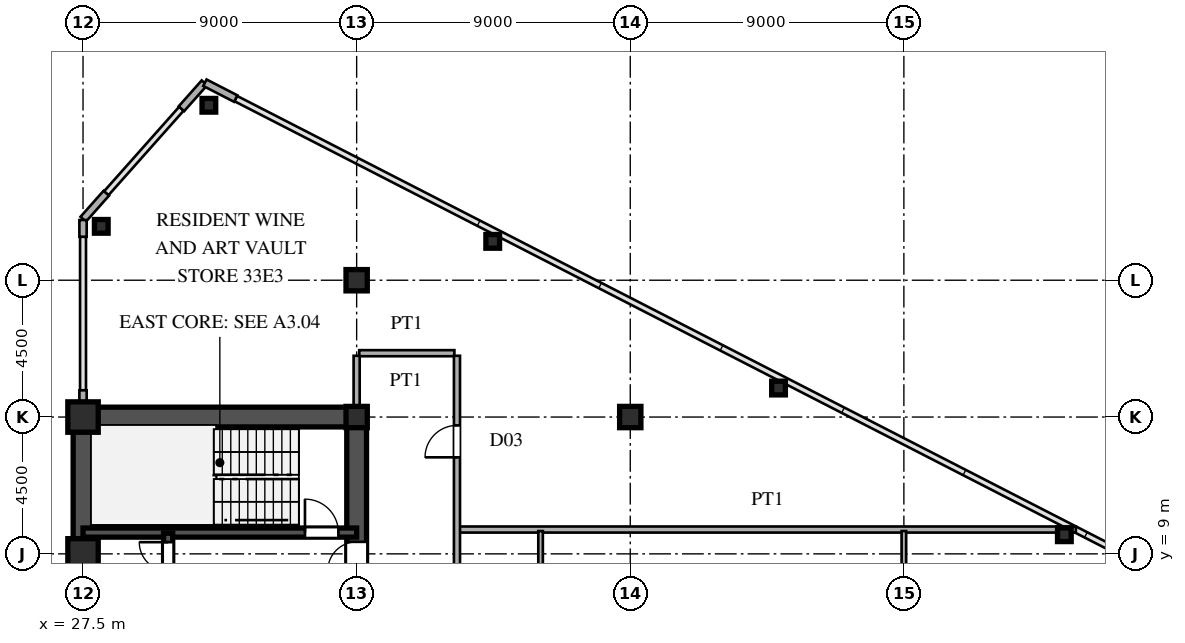
"""IFC4 building model, lengths in metres.
Left out: names, types, materials, properties, quantities, classifications, styles, units other than length and angle.
Written with IfcOpenShell. Run it as: python <this file> out.ifc"""

import sys

from ifc_helpers import new_model, si_unit, direction, frame, frame_2d, origin, origin_2d, place, context, subcontext, project, spatial, rectangle, hollow_rectangle, i_section, extrude, source, transform, mapped, element, fill, save


model = new_model("IFC4")
c1 = context("Model", 3, precision=1e-05, world=origin(), true_north=direction((0.0, 1.0)))
c2 = subcontext(c1, "Body", "Model", "MODEL_VIEW")
j1 = project(units=[si_unit("LENGTHUNIT", "METRE"), si_unit("PLANEANGLEUNIT", "RADIAN")], contexts=[c1])
p1 = place(None, origin())
s1 = spatial("IfcSite", under=j1, at=p1, CompositionType="ELEMENT")
p2 = place(p1, origin())
s2 = spatial("IfcBuilding", under=s1, at=p2, CompositionType="ELEMENT")
p3 = place(p2, frame((0.0, 0.0, 124.8)))
s3 = spatial("IfcBuildingStorey", under=s2, at=p3, CompositionType="ELEMENT", Elevation=124.8)
m1 = source(origin(), c2, "Body", "SweptSolid", [
    extrude(hollow_rectangle(XDim=1.0, YDim=1.0, WallThickness=0.042, at=origin_2d()), origin(), (0.0, 0.0, 1.0), 3.6),
])
for number, where, z_axis, x_axis in (
    (1, (27.5, 9.0, 0.0), (0.0, 0.0, 1.0), (1.0, 0.0, 0.0)),
    (2, (27.5, 13.5, 0.0), (0.0, 0.0, 1.0), (1.0, 0.0, 0.0)),
):
    element("IfcColumn", number, at=place(p3, frame(where, z_axis=z_axis, x_axis=x_axis)), inside=s3, PredefinedType="COLUMN", context=c2, shape_type="MappedRepresentation", body=[
        mapped(m1, transform((0.0, 0.0, 0.0), scale=1.0)),
    ])
m2 = source(origin(), c2, "Body", "SweptSolid", [
    extrude(i_section(OverallWidth=0.7, OverallDepth=0.7, WebThickness=0.028, FlangeThickness=0.045, at=origin_2d()), origin(), (0.0, 0.0, 1.0), 3.6),
])
for number, where, z_axis, x_axis in (
    (3, (36.5, 13.5, 0.0), (0.0, 0.0, 1.0), (1.0, 0.0, 0.0)),
    (4, (36.5, 18.0, 0.0), (0.0, 0.0, 1.0), (1.0, 0.0, 0.0)),
    (5, (45.5, 13.5, 0.0), (0.0, 0.0, 1.0), (1.0, 0.0, 0.0)),
):
    element("IfcColumn", number, at=place(p3, frame(where, z_axis=z_axis, x_axis=x_axis)), inside=s3, PredefinedType="COLUMN", context=c2, shape_type="MappedRepresentation", body=[
        mapped(m2, transform((0.0, 0.0, 0.0), scale=1.0)),
    ])
m3 = source(origin(), c2, "Body", "SweptSolid", [
    extrude(hollow_rectangle(XDim=0.45, YDim=0.45, WallThickness=0.018, at=origin_2d()), origin(), (0.0, 0.0, 1.0), 3.6),
])
for number, where, z_axis, x_axis in (
    (6, (31.64, 23.754, 0.0), (0.0, 0.0, 1.0), (1.0, 0.0, 0.0)),
    (7, (28.1, 19.772, 0.0), (0.0, 0.0, 1.0), (1.0, 0.0, 0.0)),
    (8, (40.976, 19.278, 0.0), (0.0, 0.0, 1.0), (1.0, 0.0, 0.0)),
    (9, (50.377, 14.453, 0.0), (0.0, 0.0, 1.0), (1.0, 0.0, 0.0)),
    (10, (59.779, 9.629, 0.0), (0.0, 0.0, 1.0), (1.0, 0.0, 0.0)),
):
    element("IfcColumn", number, at=place(p3, frame(where, z_axis=z_axis, x_axis=x_axis)), inside=s3, PredefinedType="COLUMN", context=c2, shape_type="MappedRepresentation", body=[
        mapped(m3, transform((0.0, 0.0, 0.0), scale=1.0)),
    ])
p4 = place(p3, frame((32.523, 23.975, 0.0), z_axis=(0.0, 0.0, 1.0), x_axis=(-0.889797395748, 0.456355776255, 0.0)))
e11 = element("IfcWall", 11, at=p4, inside=s3, PredefinedType="SOLIDWALL", context=c2, shape_type="SweptSolid", body=[
    extrude(rectangle(XDim=1.14, YDim=0.24, at=frame_2d((0.57, 0.0))), origin(), (0.0, 0.0, 1.0), 3.38),
])
for number, where, z_axis, x_axis in (
    (12, (31.493, 24.492, 0.0), (0.0, 0.0, 1.0), (-0.664, -0.747, 0.0)),
    (13, (28.264, 20.86, 0.0), (0.0, 0.0, 1.0), (-0.664, -0.747, 0.0)),
):
    element("IfcWall", number, at=place(p3, frame(where, z_axis=z_axis, x_axis=x_axis)), inside=s3, PredefinedType="SOLIDWALL", context=c2, shape_type="SweptSolid", body=[
        extrude(rectangle(XDim=1.14, YDim=0.24, at=frame_2d((0.57, 0.0))), origin(), (0.0, 0.0, 1.0), 3.38),
    ])
p5 = place(p3, frame((27.5, 13.83, 0.0), z_axis=(0.0, 0.0, 1.0), x_axis=(0.0, 1.0, 0.0)))
e14 = element("IfcWall", 14, at=p5, inside=s3, PredefinedType="SOLIDWALL", context=c2, shape_type="SweptSolid", body=[
    extrude(rectangle(XDim=0.55, YDim=0.24, at=frame_2d((0.275, 0.0))), origin(), (0.0, 0.0, 1.0), 2.88),
])
p6 = place(p3, frame((27.5, 19.43, 0.0), z_axis=(0.0, 0.0, 1.0), x_axis=(0.0, 1.0, 0.0)))
e15 = element("IfcWall", 15, at=p6, inside=s3, PredefinedType="SOLIDWALL", context=c2, shape_type="SweptSolid", body=[
    extrude(rectangle(XDim=0.55, YDim=0.24, at=frame_2d((0.275, 0.0))), origin(), (0.0, 0.0, 1.0), 3.38),
])
p7 = place(p3, frame((27.5, 1.3, 0.0), z_axis=(0.0, 0.0, 1.0), x_axis=(0.0, 1.0, 0.0)))
e16 = element("IfcWall", 16, at=p7, inside=s3, PredefinedType="SHEAR", context=c2, shape_type="SweptSolid", body=[
    extrude(rectangle(XDim=12.2, YDim=0.65, at=frame_2d((6.1, 0.0))), origin(), (0.0, 0.0, 1.0), 3.38),
])
p8 = place(p3, frame((27.5, 13.5, 0.0), z_axis=(0.0, 0.0, 1.0), x_axis=(1.0, 0.0, 0.0)))
e17 = element("IfcWall", 17, at=p8, inside=s3, PredefinedType="SHEAR", context=c2, shape_type="SweptSolid", body=[
    extrude(rectangle(XDim=9.0, YDim=0.65, at=frame_2d((4.5, 0.0))), origin(), (0.0, 0.0, 1.0), 3.38),
])
p9 = place(p3, frame((36.5, 8.2, 0.0), z_axis=(0.0, 0.0, 1.0), x_axis=(0.0, 1.0, 0.0)))
e18 = element("IfcWall", 18, at=p9, inside=s3, PredefinedType="SHEAR", context=c2, shape_type="SweptSolid", body=[
    extrude(rectangle(XDim=5.45, YDim=0.65, at=frame_2d((2.725, 0.0))), origin(), (0.0, 0.0, 1.0), 3.38),
])
p10 = place(p9, frame((0.245, 0.0, 0.0)))
e19 = element("IfcOpeningElement", 19, at=p10, cuts=e18, PredefinedType="OPENING", context=c2, shape_type="SweptSolid", body=[
    extrude(rectangle(XDim=0.95, YDim=2.15, at=frame_2d((0.475, 1.075))), frame((0.0, 0.335, 0.0), z_axis=(0.0, -1.0, 0.0), x_axis=(1.0, 0.0, 0.0)), (0.0, 0.0, 1.0), 0.67),
])
p11 = place(p3, frame((27.5, 9.7, 0.0), z_axis=(0.0, 0.0, 1.0), x_axis=(1.0, 0.0, 0.0)))
e20 = element("IfcWall", 20, at=p11, inside=s3, PredefinedType="SHEAR", context=c2, shape_type="SweptSolid", body=[
    extrude(rectangle(XDim=9.0, YDim=0.3, at=frame_2d((4.5, 0.0))), origin(), (0.0, 0.0, 1.0), 3.38),
])
p12 = place(p11, frame((7.3, 0.0, 0.0)))
e21 = element("IfcOpeningElement", 21, at=p12, cuts=e20, PredefinedType="OPENING", context=c2, shape_type="SweptSolid", body=[
    extrude(rectangle(XDim=1.1, YDim=2.2, at=frame_2d((0.55, 1.1))), frame((0.0, 0.16, 0.0), z_axis=(0.0, -1.0, 0.0), x_axis=(1.0, 0.0, 0.0)), (0.0, 0.0, 1.0), 0.32),
])
p13 = place(p3, frame((30.3, 8.15, 0.0), z_axis=(0.0, 0.0, 1.0), x_axis=(0.0, 1.0, 0.0)))
e22 = element("IfcWall", 22, at=p13, inside=s3, PredefinedType="SHEAR", context=c2, shape_type="SweptSolid", body=[
    extrude(rectangle(XDim=1.53, YDim=0.3, at=frame_2d((0.765, 0.0))), origin(), (0.0, 0.0, 1.0), 3.38),
])
p14 = place(p13, frame((0.285, 0.0, 0.0)))
e23 = element("IfcOpeningElement", 23, at=p14, cuts=e22, PredefinedType="OPENING", context=c2, shape_type="SweptSolid", body=[
    extrude(rectangle(XDim=0.95, YDim=2.15, at=frame_2d((0.475, 1.075))), frame((0.0, 0.16, 0.0), z_axis=(0.0, -1.0, 0.0), x_axis=(1.0, 0.0, 0.0)), (0.0, 0.0, 1.0), 0.32),
])
p15 = place(p3, frame((39.88, 9.8, 0.0), z_axis=(0.0, 0.0, 1.0), x_axis=(1.0, 0.0, 0.0)))
e24 = element("IfcWall", 24, at=p15, inside=s3, PredefinedType="PARTITIONING", context=c2, shape_type="SweptSolid", body=[
    extrude(rectangle(XDim=20.277, YDim=0.2, at=frame_2d((10.139, 0.0))), origin(), (0.0, 0.0, 1.0), 3.38),
])
p16 = place(p3, frame((36.585, 15.6, 0.0), z_axis=(0.0, 0.0, 1.0), x_axis=(1.0, 0.0, 0.0)))
e25 = element("IfcWall", 25, at=p16, inside=s3, PredefinedType="PARTITIONING", context=c2, shape_type="SweptSolid", body=[
    extrude(rectangle(XDim=3.13, YDim=0.2, at=frame_2d((1.565, 0.0))), origin(), (0.0, 0.0, 1.0), 3.38),
])
p17 = place(p3, frame((36.5, 13.83, 0.0), z_axis=(0.0, 0.0, 1.0), x_axis=(0.0, 1.0, 0.0)))
e26 = element("IfcWall", 26, at=p17, inside=s3, PredefinedType="PARTITIONING", context=c2, shape_type="SweptSolid", body=[
    extrude(rectangle(XDim=1.685, YDim=0.2, at=frame_2d((0.842, 0.0))), origin(), (0.0, 0.0, 1.0), 2.78),
])
p18 = place(p3, frame((39.8, -15.515, 0.0), z_axis=(0.0, 0.0, 1.0), x_axis=(0.0, 1.0, 0.0)))
e27 = element("IfcWall", 27, at=p18, inside=s3, PredefinedType="PARTITIONING", context=c2, shape_type="SweptSolid", body=[
    extrude(rectangle(XDim=31.03, YDim=0.2, at=frame_2d((15.515, 0.0))), origin(), (0.0, 0.0, 1.0), 3.38),
])
p19 = place(p18, frame((5.762, 0.0, 0.0)))
e28 = element("IfcOpeningElement", 28, at=p19, cuts=e27, PredefinedType="OPENING", context=c2, shape_type="SweptSolid", body=[
    extrude(rectangle(XDim=1.05, YDim=2.25, at=frame_2d((0.525, 1.125))), frame((0.0, 0.11, 0.0), z_axis=(0.0, -1.0, 0.0), x_axis=(1.0, 0.0, 0.0)), (0.0, 0.0, 1.0), 0.22),
])
p20 = place(p18, frame((18.301, 0.0, 0.0)))
e29 = element("IfcOpeningElement", 29, at=p20, cuts=e27, PredefinedType="OPENING", context=c2, shape_type="SweptSolid", body=[
    extrude(rectangle(XDim=1.05, YDim=2.25, at=frame_2d((0.525, 1.125))), frame((0.0, 0.11, 0.0), z_axis=(0.0, -1.0, 0.0), x_axis=(1.0, 0.0, 0.0)), (0.0, 0.0, 1.0), 0.22),
])
p21 = place(p18, frame((27.69, 0.0, 0.0)))
e30 = element("IfcOpeningElement", 30, at=p21, cuts=e27, PredefinedType="OPENING", context=c2, shape_type="SweptSolid", body=[
    extrude(rectangle(XDim=1.05, YDim=2.25, at=frame_2d((0.525, 1.125))), frame((0.0, 0.11, 0.0), z_axis=(0.0, -1.0, 0.0), x_axis=(1.0, 0.0, 0.0)), (0.0, 0.0, 1.0), 0.22),
])
p22 = place(p3, frame((42.55, 6.072, 0.0), z_axis=(0.0, 0.0, 1.0), x_axis=(0.0, 1.0, 0.0)))
e31 = element("IfcWall", 31, at=p22, inside=s3, PredefinedType="PARTITIONING", context=c2, shape_type="SweptSolid", body=[
    extrude(rectangle(XDim=3.678, YDim=0.15, at=frame_2d((1.839, 0.0))), origin(), (0.0, 0.0, 1.0), 3.38),
])
p23 = place(p3, frame((54.5, -12.732, 0.0), z_axis=(0.0, 0.0, 1.0), x_axis=(0.0, 1.0, 0.0)))
e32 = element("IfcWall", 32, at=p23, inside=s3, PredefinedType="PARTITIONING", context=c2, shape_type="SweptSolid", body=[
    extrude(rectangle(XDim=22.482, YDim=0.15, at=frame_2d((11.241, 0.0))), origin(), (0.0, 0.0, 1.0), 2.78),
])
p24 = place(p23, frame((1.837, 0.0, 0.0)))
e33 = element("IfcOpeningElement", 33, at=p24, cuts=e32, PredefinedType="OPENING", context=c2, shape_type="SweptSolid", body=[
    extrude(rectangle(XDim=0.95, YDim=2.15, at=frame_2d((0.475, 1.075))), frame((0.0, 0.085, 0.0), z_axis=(0.0, -1.0, 0.0), x_axis=(1.0, 0.0, 0.0)), (0.0, 0.0, 1.0), 0.17),
])
p25 = place(p23, frame((6.785, 0.0, 0.0)))
e34 = element("IfcOpeningElement", 34, at=p25, cuts=e32, PredefinedType="OPENING", context=c2, shape_type="SweptSolid", body=[
    extrude(rectangle(XDim=0.95, YDim=2.15, at=frame_2d((0.475, 1.075))), frame((0.0, 0.085, 0.0), z_axis=(0.0, -1.0, 0.0), x_axis=(1.0, 0.0, 0.0)), (0.0, 0.0, 1.0), 0.17),
])
p26 = place(p23, frame((15.757, 0.0, 0.0)))
e35 = element("IfcOpeningElement", 35, at=p26, cuts=e32, PredefinedType="OPENING", context=c2, shape_type="SweptSolid", body=[
    extrude(rectangle(XDim=0.95, YDim=2.15, at=frame_2d((0.475, 1.075))), frame((0.0, 0.085, 0.0), z_axis=(0.0, -1.0, 0.0), x_axis=(1.0, 0.0, 0.0)), (0.0, 0.0, 1.0), 0.17),
])
m4 = source(origin(), c2, "Body", "SweptSolid", [
    extrude(rectangle(XDim=0.95, YDim=2.15, at=frame_2d((0.475, 1.075))), frame((0.0, 0.025, 0.0), z_axis=(0.0, -1.0, 0.0), x_axis=(1.0, 0.0, 0.0)), (0.0, 0.0, 1.0), 0.05),
])
p27 = place(p10, origin())
e36 = element("IfcDoor", 36, at=p27, inside=s3, OperationType="SINGLE_SWING_LEFT", PredefinedType="DOOR", context=c2, shape_type="MappedRepresentation", body=[
    mapped(m4, transform((0.0, 0.0, 0.0), scale=1.0)),
])
fill(e19, e36)
m5 = source(origin(), c2, "Body", "SweptSolid", [
    extrude(rectangle(XDim=1.1, YDim=2.2, at=frame_2d((0.55, 1.1))), frame((0.0, 0.025, 0.0), z_axis=(0.0, -1.0, 0.0), x_axis=(1.0, 0.0, 0.0)), (0.0, 0.0, 1.0), 0.05),
])
p28 = place(p12, origin())
e37 = element("IfcDoor", 37, at=p28, inside=s3, OperationType="SINGLE_SWING_LEFT", PredefinedType="DOOR", context=c2, shape_type="MappedRepresentation", body=[
    mapped(m5, transform((0.0, 0.0, 0.0), scale=1.0)),
])
fill(e21, e37)
p29 = place(p14, origin())
e38 = element("IfcDoor", 38, at=p29, inside=s3, OperationType="SINGLE_SWING_RIGHT", PredefinedType="DOOR", context=c2, shape_type="MappedRepresentation", body=[
    mapped(m4, transform((0.0, 0.0, 0.0), scale=1.0)),
])
fill(e23, e38)
m6 = source(origin(), c2, "Body", "SweptSolid", [
    extrude(rectangle(XDim=1.05, YDim=2.25, at=frame_2d((0.525, 1.125))), frame((0.0, 0.025, 0.0), z_axis=(0.0, -1.0, 0.0), x_axis=(1.0, 0.0, 0.0)), (0.0, 0.0, 1.0), 0.05),
])
p30 = place(p21, origin())
e39 = element("IfcDoor", 39, at=p30, inside=s3, OperationType="SINGLE_SWING_LEFT", PredefinedType="DOOR", context=c2, shape_type="MappedRepresentation", body=[
    mapped(m6, transform((0.0, 0.0, 0.0), scale=1.0)),
])
fill(e30, e39)
save(model, sys.argv[1])
